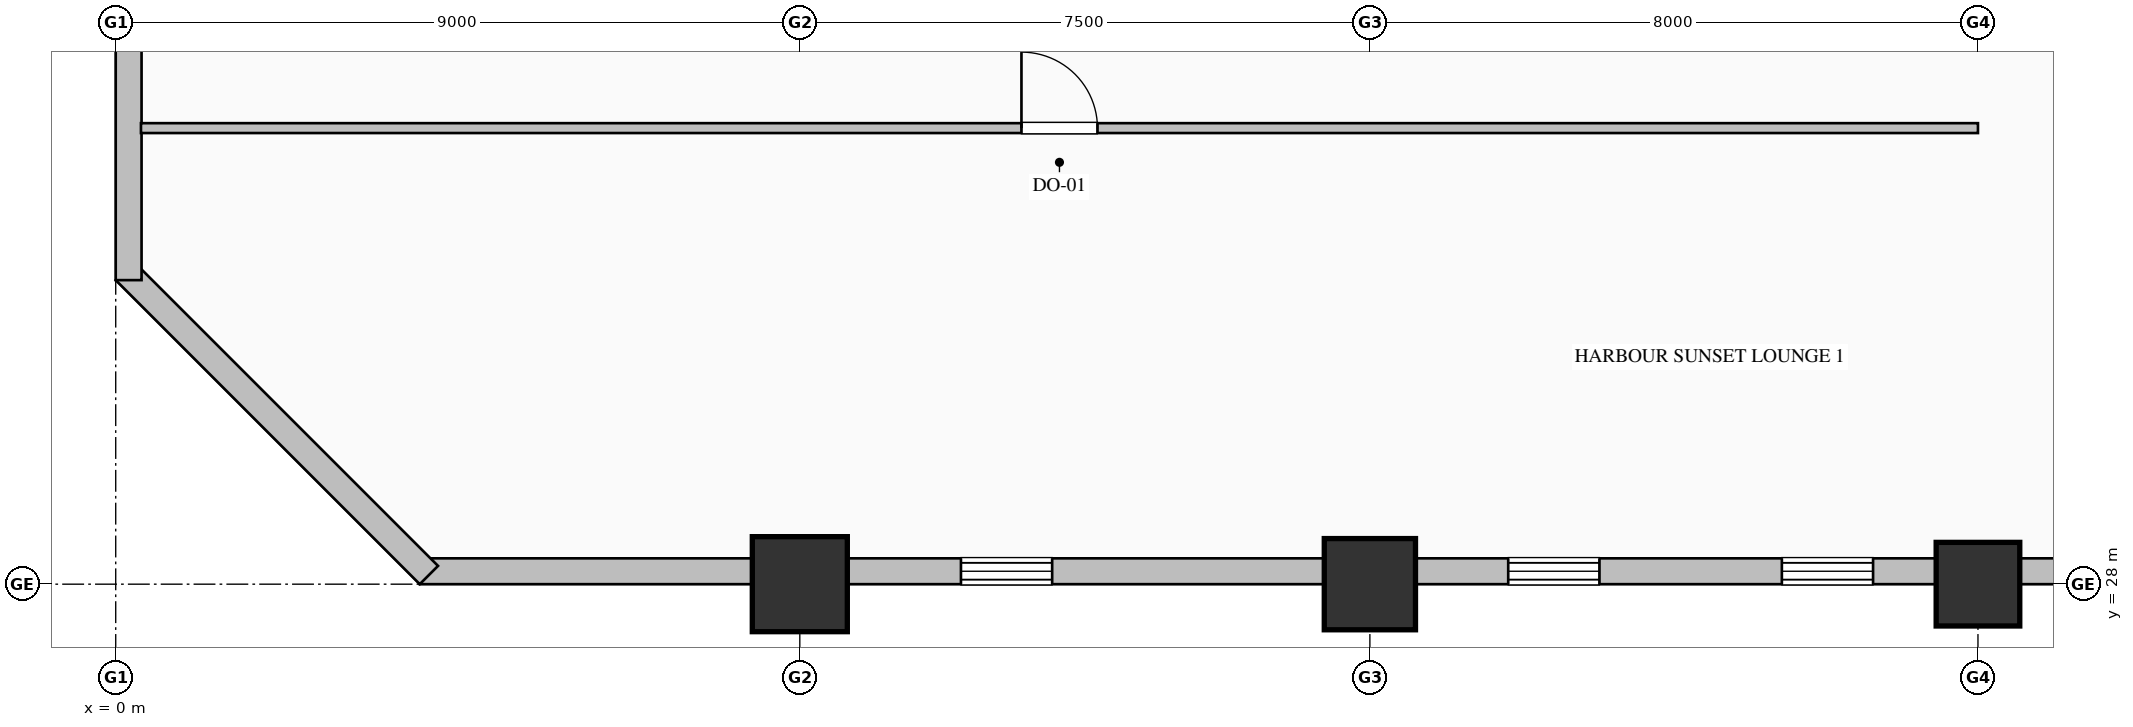
"""IFC4 building model, lengths in metres.
Left out: names, types, materials, properties, quantities, classifications, styles, units other than length and angle.
Written with IfcOpenShell. Run it as: python <this file> out.ifc"""

import sys

from ifc_helpers import new_model, si_unit, direction, frame, frame_2d, origin, origin_2d, place, context, subcontext, project, spatial, rectangle, hollow_rectangle, hollow_circle, extrude, element, fill, save


model = new_model("IFC4")
c1 = context("Model", 3, precision=1e-05, world=origin(), true_north=direction((0.0, 1.0)))
c2 = subcontext(c1, "Body", "Model", "MODEL_VIEW")
j1 = project(units=[si_unit("LENGTHUNIT", "METRE"), si_unit("PLANEANGLEUNIT", "RADIAN")], contexts=[c1])
p1 = place(None, origin())
s1 = spatial("IfcSite", under=j1, at=p1, CompositionType="ELEMENT")
p2 = place(p1, origin())
s2 = spatial("IfcBuilding", under=s1, at=p2, CompositionType="ELEMENT")
p3 = place(p2, frame((0.0, 0.0, 72.2)))
s3 = spatial("IfcBuildingStorey", under=s2, at=p3, CompositionType="ELEMENT", Elevation=72.2)
p4 = place(p3, frame((9.0, 28.0, 0.0), z_axis=(0.0, 0.0, 1.0), x_axis=(1.0, 0.0, 0.0)))
e1 = element("IfcColumn", 1, at=p4, inside=s3, PredefinedType="COLUMN", context=c2, shape_type="SweptSolid", body=[
    extrude(hollow_rectangle(XDim=1.25, YDim=1.25, WallThickness=0.045, at=origin_2d()), origin(), (0.0, 0.0, 1.0), 4.0),
])
p5 = place(p3, frame((16.5, 28.0, 0.0), z_axis=(0.0, 0.0, 1.0), x_axis=(1.0, 0.0, 0.0)))
e2 = element("IfcColumn", 2, at=p5, inside=s3, PredefinedType="COLUMN", context=c2, shape_type="SweptSolid", body=[
    extrude(hollow_circle(Radius=0.6, WallThickness=0.04, at=origin_2d()), origin(), (0.0, 0.0, 1.0), 4.0),
])
p6 = place(p3, frame((24.5, 28.0, 0.0), z_axis=(0.0, 0.0, 1.0), x_axis=(1.0, 0.0, 0.0)))
e3 = element("IfcColumn", 3, at=p6, inside=s3, PredefinedType="COLUMN", context=c2, shape_type="SweptSolid", body=[
    extrude(hollow_rectangle(XDim=1.1, YDim=1.1, WallThickness=0.04, at=origin_2d()), origin(), (0.0, 0.0, 1.0), 4.0),
])
p7 = place(p3, frame((40.52, 28.17, 0.0), z_axis=(0.0, 0.0, 1.0), x_axis=(-1.0, 0.0, 0.0)))
e4 = element("IfcWall", 4, at=p7, inside=s3, PredefinedType="SOLIDWALL", context=c2, shape_type="SweptSolid", body=[
    extrude(rectangle(XDim=36.52, YDim=0.34, at=frame_2d((18.26, 0.0))), origin(), (0.0, 0.0, 1.0), 3.05),
])
p8 = place(p7, frame((3.0, 0.0, 0.7)))
e5 = element("IfcOpeningElement", 5, at=p8, cuts=e4, PredefinedType="OPENING", context=c2, shape_type="SweptSolid", body=[
    extrude(rectangle(XDim=1.2, YDim=1.85, at=frame_2d((0.6, 0.925))), frame((0.0, 0.18, 0.0), z_axis=(0.0, -1.0, 0.0), x_axis=(1.0, 0.0, 0.0)), (0.0, 0.0, 1.0), 0.36),
])
p9 = place(p7, frame((10.2, 0.0, 0.7)))
e6 = element("IfcOpeningElement", 6, at=p9, cuts=e4, PredefinedType="OPENING", context=c2, shape_type="SweptSolid", body=[
    extrude(rectangle(XDim=1.2, YDim=1.85, at=frame_2d((0.6, 0.925))), frame((0.0, 0.18, 0.0), z_axis=(0.0, -1.0, 0.0), x_axis=(1.0, 0.0, 0.0)), (0.0, 0.0, 1.0), 0.36),
])
p10 = place(p7, frame((13.8, 0.0, 0.7)))
e7 = element("IfcOpeningElement", 7, at=p10, cuts=e4, PredefinedType="OPENING", context=c2, shape_type="SweptSolid", body=[
    extrude(rectangle(XDim=1.2, YDim=1.85, at=frame_2d((0.6, 0.925))), frame((0.0, 0.18, 0.0), z_axis=(0.0, -1.0, 0.0), x_axis=(1.0, 0.0, 0.0)), (0.0, 0.0, 1.0), 0.36),
])
p11 = place(p7, frame((17.4, 0.0, 0.7)))
e8 = element("IfcOpeningElement", 8, at=p11, cuts=e4, PredefinedType="OPENING", context=c2, shape_type="SweptSolid", body=[
    extrude(rectangle(XDim=1.2, YDim=1.85, at=frame_2d((0.6, 0.925))), frame((0.0, 0.18, 0.0), z_axis=(0.0, -1.0, 0.0), x_axis=(1.0, 0.0, 0.0)), (0.0, 0.0, 1.0), 0.36),
])
p12 = place(p7, frame((21.0, 0.0, 0.7)))
e9 = element("IfcOpeningElement", 9, at=p12, cuts=e4, PredefinedType="OPENING", context=c2, shape_type="SweptSolid", body=[
    extrude(rectangle(XDim=1.2, YDim=1.85, at=frame_2d((0.6, 0.925))), frame((0.0, 0.18, 0.0), z_axis=(0.0, -1.0, 0.0), x_axis=(1.0, 0.0, 0.0)), (0.0, 0.0, 1.0), 0.36),
])
p13 = place(p7, frame((28.2, 0.0, 0.7)))
e10 = element("IfcOpeningElement", 10, at=p13, cuts=e4, PredefinedType="OPENING", context=c2, shape_type="SweptSolid", body=[
    extrude(rectangle(XDim=1.2, YDim=1.85, at=frame_2d((0.6, 0.925))), frame((0.0, 0.18, 0.0), z_axis=(0.0, -1.0, 0.0), x_axis=(1.0, 0.0, 0.0)), (0.0, 0.0, 1.0), 0.36),
])
p14 = place(p3, frame((4.12, 28.12, 0.0), z_axis=(0.0, 0.0, 1.0), x_axis=(-0.707106781187, 0.707106781187, 0.0)))
e11 = element("IfcWall", 11, at=p14, inside=s3, PredefinedType="SOLIDWALL", context=c2, shape_type="SweptSolid", body=[
    extrude(rectangle(XDim=5.657, YDim=0.34, at=frame_2d((2.828, 0.0))), origin(), (0.0, 0.0, 1.0), 3.75),
])
p15 = place(p3, frame((0.17, 32.0, 0.0), z_axis=(0.0, 0.0, 1.0), x_axis=(0.0, 1.0, 0.0)))
e12 = element("IfcWall", 12, at=p15, inside=s3, PredefinedType="SOLIDWALL", context=c2, shape_type="SweptSolid", body=[
    extrude(rectangle(XDim=16.0, YDim=0.34, at=frame_2d((8.0, 0.0))), origin(), (0.0, 0.0, 1.0), 3.25),
])
p16 = place(p3, frame((0.332, 34.0, 0.0), z_axis=(0.0, 0.0, 1.0), x_axis=(1.0, 0.0, 0.0)))
e13 = element("IfcWall", 13, at=p16, inside=s3, PredefinedType="PARTITIONING", context=c2, shape_type="SweptSolid", body=[
    extrude(rectangle(XDim=24.168, YDim=0.13, at=frame_2d((12.084, 0.0))), origin(), (0.0, 0.0, 1.0), 3.75),
])
p17 = place(p16, frame((11.584, 0.0, 0.0)))
e14 = element("IfcOpeningElement", 14, at=p17, cuts=e13, PredefinedType="OPENING", context=c2, shape_type="SweptSolid", body=[
    extrude(rectangle(XDim=1.0, YDim=2.15, at=frame_2d((0.5, 1.075))), frame((0.0, 0.075, 0.0), z_axis=(0.0, -1.0, 0.0), x_axis=(1.0, 0.0, 0.0)), (0.0, 0.0, 1.0), 0.15),
])
p18 = place(p11, origin())
e15 = element("IfcWindow", 15, at=p18, inside=s3, PartitioningType="DOUBLE_PANEL_VERTICAL", PredefinedType="WINDOW", context=c2, shape_type="SweptSolid", body=[
    extrude(rectangle(XDim=1.2, YDim=1.85, at=frame_2d((0.6, 0.925))), frame((0.0, 0.15, 0.0), z_axis=(0.0, -1.0, 0.0), x_axis=(1.0, 0.0, 0.0)), (0.0, 0.0, 1.0), 0.06),
])
fill(e8, e15)
p19 = place(p12, origin())
e16 = element("IfcWindow", 16, at=p19, inside=s3, PartitioningType="DOUBLE_PANEL_VERTICAL", PredefinedType="WINDOW", context=c2, shape_type="SweptSolid", body=[
    extrude(rectangle(XDim=1.2, YDim=1.85, at=frame_2d((0.6, 0.925))), frame((0.0, 0.15, 0.0), z_axis=(0.0, -1.0, 0.0), x_axis=(1.0, 0.0, 0.0)), (0.0, 0.0, 1.0), 0.06),
])
fill(e9, e16)
p20 = place(p13, origin())
e17 = element("IfcWindow", 17, at=p20, inside=s3, PartitioningType="DOUBLE_PANEL_VERTICAL", PredefinedType="WINDOW", context=c2, shape_type="SweptSolid", body=[
    extrude(rectangle(XDim=1.2, YDim=1.85, at=frame_2d((0.6, 0.925))), frame((0.0, 0.15, 0.0), z_axis=(0.0, -1.0, 0.0), x_axis=(1.0, 0.0, 0.0)), (0.0, 0.0, 1.0), 0.06),
])
fill(e10, e17)
p21 = place(p17, origin())
e18 = element("IfcDoor", 18, at=p21, inside=s3, OperationType="SINGLE_SWING_LEFT", PredefinedType="DOOR", context=c2, shape_type="SweptSolid", body=[
    extrude(rectangle(XDim=1.0, YDim=2.15, at=frame_2d((0.5, 1.075))), frame((0.0, 0.025, 0.0), z_axis=(0.0, -1.0, 0.0), x_axis=(1.0, 0.0, 0.0)), (0.0, 0.0, 1.0), 0.05),
])
fill(e14, e18)
save(model, sys.argv[1])
